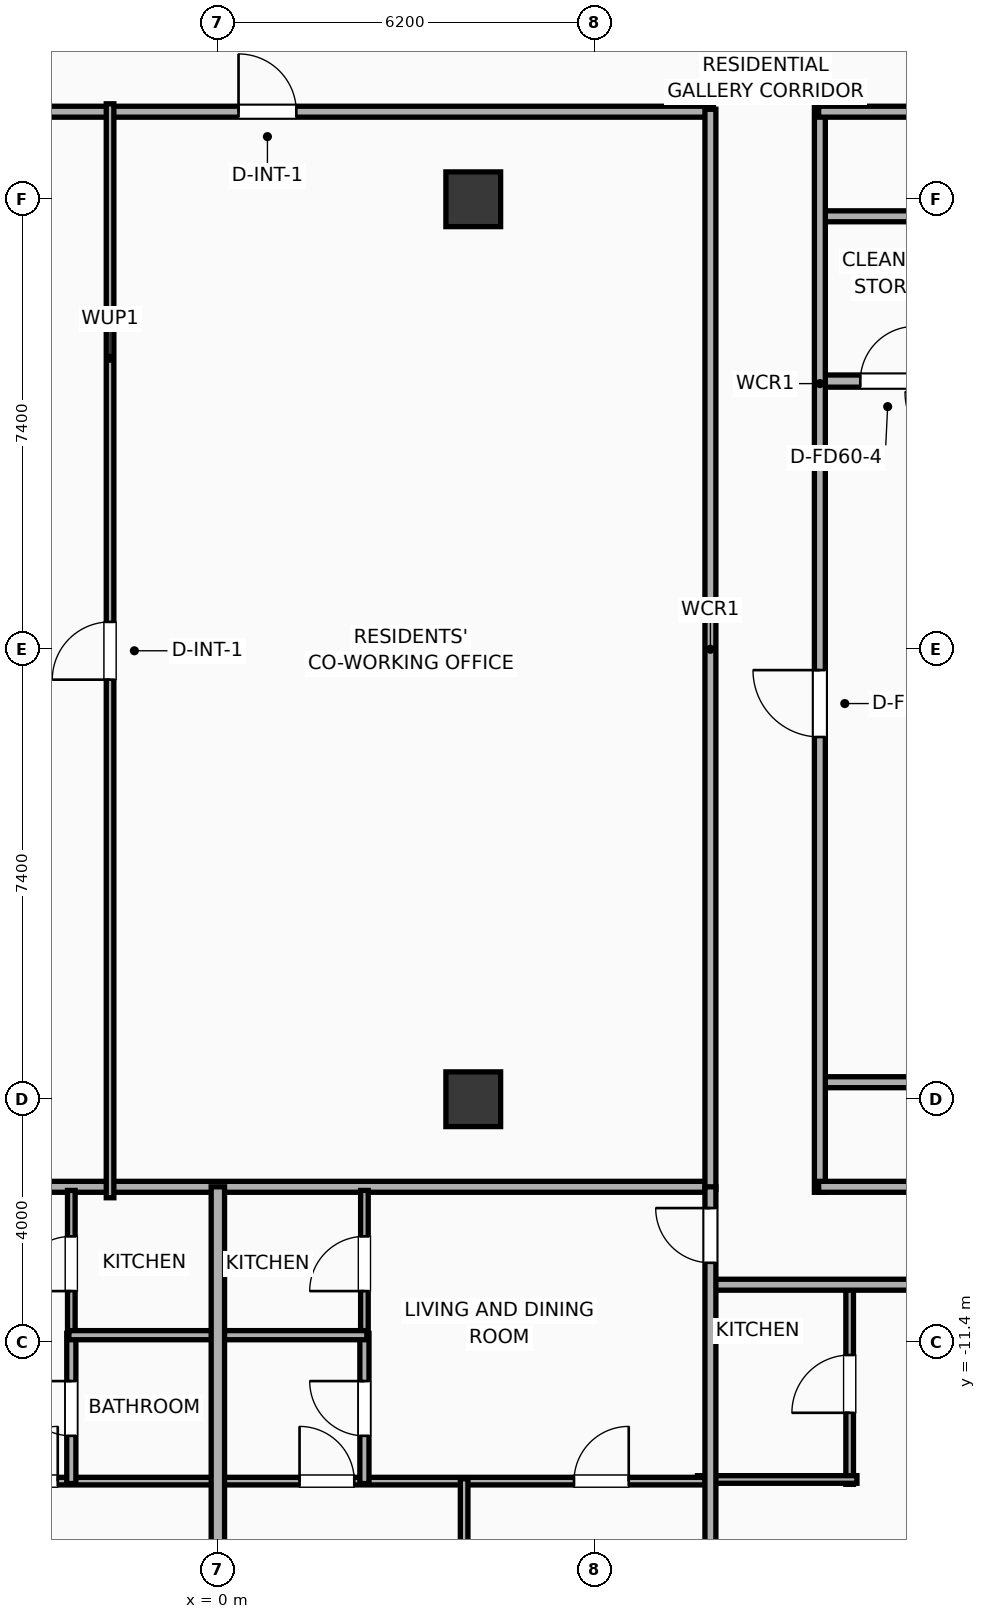
"""IFC4 building model, lengths in metres.
Left out: names, types, materials, properties, quantities, classifications, styles, units other than length and angle.
Written with IfcOpenShell. Run it as: python <this file> out.ifc"""

import sys

from ifc_helpers import new_model, si_unit, direction, frame, frame_2d, origin, origin_2d, place, context, subcontext, project, spatial, rectangle, extrude, element, fill, save


model = new_model("IFC4")
c1 = context("Model", 3, precision=1e-05, world=origin(), true_north=direction((0.0, 1.0)))
c2 = subcontext(c1, "Body", "Model", "MODEL_VIEW")
j1 = project(units=[si_unit("LENGTHUNIT", "METRE"), si_unit("PLANEANGLEUNIT", "RADIAN")], contexts=[c1])
p1 = place(None, origin())
s1 = spatial("IfcSite", under=j1, at=p1, CompositionType="ELEMENT")
p2 = place(p1, origin())
s2 = spatial("IfcBuilding", under=s1, at=p2, CompositionType="ELEMENT")
p3 = place(p2, frame((0.0, 0.0, 306.8)))
s3 = spatial("IfcBuildingStorey", under=s2, at=p3, CompositionType="ELEMENT", Elevation=306.8)
for number, where, z_axis, x_axis in (
    (1, (4.2, -7.4, 0.0), (0.0, 0.0, 1.0), (1.0, 0.0, 0.0)),
    (2, (4.2, 7.4, 0.0), (0.0, 0.0, 1.0), (1.0, 0.0, 0.0)),
):
    element("IfcColumn", number, at=place(p3, frame(where, z_axis=z_axis, x_axis=x_axis)), inside=s3, PredefinedType="COLUMN", context=c2, shape_type="SweptSolid", body=[
        extrude(rectangle(XDim=0.9, YDim=0.9, at=origin_2d()), origin(), (0.0, 0.0, 1.0), 3.9),
    ])
p4 = place(p3, frame((9.88, 4.41, 0.0), z_axis=(0.0, 0.0, 1.0), x_axis=(1.0, 0.0, 0.0)))
e3 = element("IfcWall", 3, at=p4, inside=s3, PredefinedType="PARTITIONING", context=c2, shape_type="SweptSolid", body=[
    extrude(rectangle(XDim=2.27, YDim=0.2, at=frame_2d((1.135, 0.0))), origin(), (0.0, 0.0, 1.0), 3.5),
])
p5 = place(p4, frame((0.685, 0.0, 0.0)))
e4 = element("IfcOpeningElement", 4, at=p5, cuts=e3, PredefinedType="OPENING", context=c2, shape_type="SweptSolid", body=[
    extrude(rectangle(XDim=0.9, YDim=2.05, at=frame_2d((0.45, 1.025))), frame((0.0, 0.11, 0.0), z_axis=(0.0, -1.0, 0.0), x_axis=(1.0, 0.0, 0.0)), (0.0, 0.0, 1.0), 0.22),
])
for number, where, z_axis, x_axis in (
    (5, (9.88, 7.12, 0.0), (0.0, 0.0, 1.0), (1.0, 0.0, 0.0)),
    (6, (9.88, -7.12, 0.0), (0.0, 0.0, 1.0), (1.0, 0.0, 0.0)),
):
    element("IfcWall", number, at=place(p3, frame(where, z_axis=z_axis, x_axis=x_axis)), inside=s3, PredefinedType="PARTITIONING", context=c2, shape_type="SweptSolid", body=[
        extrude(rectangle(XDim=2.27, YDim=0.18, at=frame_2d((1.135, 0.0))), origin(), (0.0, 0.0, 1.0), 2.54),
    ])
p6 = place(p3, frame((9.9, -8.93, 0.0), z_axis=(0.0, 0.0, 1.0), x_axis=(0.0, 1.0, 0.0)))
e7 = element("IfcWall", 7, at=p6, inside=s3, PredefinedType="PARTITIONING", context=c2, shape_type="SweptSolid", body=[
    extrude(rectangle(XDim=17.86, YDim=0.18, at=frame_2d((8.93, 0.0))), origin(), (0.0, 0.0, 1.0), 3.5),
])
p7 = place(p6, frame((7.487, 0.0, 0.0)))
e8 = element("IfcOpeningElement", 8, at=p7, cuts=e7, PredefinedType="OPENING", context=c2, shape_type="SweptSolid", body=[
    extrude(rectangle(XDim=1.1, YDim=2.05, at=frame_2d((0.55, 1.025))), frame((0.0, 0.1, 0.0), z_axis=(0.0, -1.0, 0.0), x_axis=(1.0, 0.0, 0.0)), (0.0, 0.0, 1.0), 0.2),
])
p8 = place(p3, frame((9.88, 8.84, 0.0), z_axis=(0.0, 0.0, 1.0), x_axis=(1.0, 0.0, 0.0)))
e9 = element("IfcWall", 9, at=p8, inside=s3, PredefinedType="PARTITIONING", context=c2, shape_type="SweptSolid", body=[
    extrude(rectangle(XDim=15.427, YDim=0.18, at=frame_2d((7.713, 0.0))), origin(), (0.0, 0.0, 1.0), 3.5),
])
p9 = place(p8, frame((12.663, 0.0, 0.0)))
e10 = element("IfcOpeningElement", 10, at=p9, cuts=e9, PredefinedType="OPENING", context=c2, shape_type="SweptSolid", body=[
    extrude(rectangle(XDim=0.9, YDim=2.05, at=frame_2d((0.45, 1.025))), frame((0.0, 0.1, 0.0), z_axis=(0.0, -1.0, 0.0), x_axis=(1.0, 0.0, 0.0)), (0.0, 0.0, 1.0), 0.2),
])
p10 = place(p3, frame((9.88, -8.84, 0.0), z_axis=(0.0, 0.0, 1.0), x_axis=(1.0, 0.0, 0.0)))
e11 = element("IfcWall", 11, at=p10, inside=s3, PredefinedType="PARTITIONING", context=c2, shape_type="SweptSolid", body=[
    extrude(rectangle(XDim=13.569, YDim=0.18, at=frame_2d((6.784, 0.0))), origin(), (0.0, 0.0, 1.0), 2.39),
])
p11 = place(p3, frame((-8.15, 8.84, 0.0), z_axis=(0.0, 0.0, 1.0), x_axis=(1.0, 0.0, 0.0)))
e12 = element("IfcWall", 12, at=p11, inside=s3, PredefinedType="PARTITIONING", context=c2, shape_type="SweptSolid", body=[
    extrude(rectangle(XDim=16.3, YDim=0.18, at=frame_2d((8.15, 0.0))), origin(), (0.0, 0.0, 1.0), 3.5),
])
p12 = place(p11, frame((8.49, 0.0, 0.0)))
e13 = element("IfcOpeningElement", 13, at=p12, cuts=e12, PredefinedType="OPENING", context=c2, shape_type="SweptSolid", body=[
    extrude(rectangle(XDim=0.95, YDim=2.05, at=frame_2d((0.475, 1.025))), frame((0.0, 0.1, 0.0), z_axis=(0.0, -1.0, 0.0), x_axis=(1.0, 0.0, 0.0)), (0.0, 0.0, 1.0), 0.2),
])
p13 = place(p3, frame((-8.15, -8.84, 0.0), z_axis=(0.0, 0.0, 1.0), x_axis=(1.0, 0.0, 0.0)))
e14 = element("IfcWall", 14, at=p13, inside=s3, PredefinedType="PARTITIONING", context=c2, shape_type="SweptSolid", body=[
    extrude(rectangle(XDim=16.3, YDim=0.18, at=frame_2d((8.15, 0.0))), origin(), (0.0, 0.0, 1.0), 3.5),
])
p14 = place(p3, frame((8.1, -8.88, 0.0), z_axis=(0.0, 0.0, 1.0), x_axis=(0.0, 1.0, 0.0)))
e15 = element("IfcWall", 15, at=p14, inside=s3, PredefinedType="PARTITIONING", context=c2, shape_type="SweptSolid", body=[
    extrude(rectangle(XDim=17.76, YDim=0.18, at=frame_2d((8.88, 0.0))), origin(), (0.0, 0.0, 1.0), 3.5),
])
p15 = place(p3, frame((-1.773, -9.02, 0.0), z_axis=(0.0, 0.0, 1.0), x_axis=(0.0, 1.0, 0.0)))
e16 = element("IfcWall", 16, at=p15, inside=s3, PredefinedType="PARTITIONING", context=c2, shape_type="SweptSolid", body=[
    extrude(rectangle(XDim=17.99, YDim=0.125, at=frame_2d((8.995, 0.0))), origin(), (0.0, 0.0, 1.0), 3.5),
])
p16 = place(p15, frame((8.52, 0.0, 0.0)))
e17 = element("IfcOpeningElement", 17, at=p16, cuts=e16, PredefinedType="OPENING", context=c2, shape_type="SweptSolid", body=[
    extrude(rectangle(XDim=0.95, YDim=2.05, at=frame_2d((0.475, 1.025))), frame((0.0, 0.073, 0.0), z_axis=(0.0, -1.0, 0.0), x_axis=(1.0, 0.0, 0.0)), (0.0, 0.0, 1.0), 0.145),
])
p17 = place(p3, frame((10.39, -13.733, 0.0), z_axis=(0.0, 0.0, 1.0), x_axis=(0.0, 1.0, 0.0)))
e18 = element("IfcWall", 18, at=p17, inside=s3, PredefinedType="PARTITIONING", context=c2, shape_type="SweptSolid", body=[
    extrude(rectangle(XDim=3.303, YDim=0.125, at=frame_2d((1.651, 0.0))), origin(), (0.0, 0.0, 1.0), 2.39),
])
p18 = place(p17, frame((1.177, 0.0, 0.0)))
e19 = element("IfcOpeningElement", 19, at=p18, cuts=e18, PredefinedType="OPENING", context=c2, shape_type="SweptSolid", body=[
    extrude(rectangle(XDim=0.95, YDim=2.05, at=frame_2d((0.475, 1.025))), frame((0.0, 0.073, 0.0), z_axis=(0.0, -1.0, 0.0), x_axis=(1.0, 0.0, 0.0)), (0.0, 0.0, 1.0), 0.145),
])
p19 = place(p3, frame((7.887, -13.653, 0.0), z_axis=(0.0, 0.0, 1.0), x_axis=(1.0, 0.0, 0.0)))
e20 = element("IfcWall", 20, at=p19, inside=s3, PredefinedType="PARTITIONING", context=c2, shape_type="SweptSolid", body=[
    extrude(rectangle(XDim=2.623, YDim=0.125, at=frame_2d((1.311, 0.0))), origin(), (0.0, 0.0, 1.0), 3.5),
])
p20 = place(p3, frame((8.08, -10.45, 0.0), z_axis=(0.0, 0.0, 1.0), x_axis=(1.0, 0.0, 0.0)))
e21 = element("IfcWall", 21, at=p20, inside=s3, PredefinedType="PARTITIONING", context=c2, shape_type="SweptSolid", body=[
    extrude(rectangle(XDim=15.199, YDim=0.18, at=frame_2d((7.6, 0.0))), origin(), (0.0, 0.0, 1.0), 3.5),
])
p21 = place(p20, frame((3.39, 0.0, 0.0)))
e22 = element("IfcOpeningElement", 22, at=p21, cuts=e21, PredefinedType="OPENING", context=c2, shape_type="SweptSolid", body=[
    extrude(rectangle(XDim=1.15, YDim=2.05, at=frame_2d((0.575, 1.025))), frame((0.0, 0.1, 0.0), z_axis=(0.0, -1.0, 0.0), x_axis=(1.0, 0.0, 0.0)), (0.0, 0.0, 1.0), 0.2),
])
p22 = place(p20, frame((11.024, 0.0, 0.0)))
e23 = element("IfcOpeningElement", 23, at=p22, cuts=e21, PredefinedType="OPENING", context=c2, shape_type="SweptSolid", body=[
    extrude(rectangle(XDim=1.15, YDim=2.05, at=frame_2d((0.575, 1.025))), frame((0.0, 0.1, 0.0), z_axis=(0.0, -1.0, 0.0), x_axis=(1.0, 0.0, 0.0)), (0.0, 0.0, 1.0), 0.2),
])
p23 = place(p3, frame((-8.08, -13.68, 0.0), z_axis=(0.0, 0.0, 1.0), x_axis=(1.0, 0.0, 0.0)))
e24 = element("IfcWall", 24, at=p23, inside=s3, PredefinedType="PARTITIONING", context=c2, shape_type="SweptSolid", body=[
    extrude(rectangle(XDim=8.06, YDim=0.125, at=frame_2d((4.03, 0.0))), origin(), (0.0, 0.0, 1.0), 3.5),
])
p24 = place(p23, frame((1.323, 0.0, 0.0)))
e25 = element("IfcOpeningElement", 25, at=p24, cuts=e24, PredefinedType="OPENING", context=c2, shape_type="SweptSolid", body=[
    extrude(rectangle(XDim=0.9, YDim=2.05, at=frame_2d((0.45, 1.025))), frame((0.0, 0.073, 0.0), z_axis=(0.0, -1.0, 0.0), x_axis=(1.0, 0.0, 0.0)), (0.0, 0.0, 1.0), 0.145),
])
p25 = place(p23, frame((4.547, 0.0, 0.0)))
e26 = element("IfcOpeningElement", 26, at=p25, cuts=e24, PredefinedType="OPENING", context=c2, shape_type="SweptSolid", body=[
    extrude(rectangle(XDim=0.9, YDim=2.05, at=frame_2d((0.45, 1.025))), frame((0.0, 0.073, 0.0), z_axis=(0.0, -1.0, 0.0), x_axis=(1.0, 0.0, 0.0)), (0.0, 0.0, 1.0), 0.145),
])
p26 = place(p3, frame((-2.41, -11.31, 0.0), z_axis=(0.0, 0.0, 1.0), x_axis=(0.0, 1.0, 0.0)))
e27 = element("IfcWall", 27, at=p26, inside=s3, PredefinedType="PARTITIONING", context=c2, shape_type="SweptSolid", body=[
    extrude(rectangle(XDim=2.41, YDim=0.125, at=frame_2d((1.205, 0.0))), origin(), (0.0, 0.0, 1.0), 3.5),
])
p27 = place(p26, frame((0.755, 0.0, 0.0)))
e28 = element("IfcOpeningElement", 28, at=p27, cuts=e27, PredefinedType="OPENING", context=c2, shape_type="SweptSolid", body=[
    extrude(rectangle(XDim=0.9, YDim=2.05, at=frame_2d((0.45, 1.025))), frame((0.0, 0.073, 0.0), z_axis=(0.0, -1.0, 0.0), x_axis=(1.0, 0.0, 0.0)), (0.0, 0.0, 1.0), 0.145),
])
p28 = place(p3, frame((-2.41, -13.72, 0.0), z_axis=(0.0, 0.0, 1.0), x_axis=(0.0, 1.0, 0.0)))
e29 = element("IfcWall", 29, at=p28, inside=s3, PredefinedType="PLUMBINGWALL", context=c2, shape_type="SweptSolid", body=[
    extrude(rectangle(XDim=2.47, YDim=0.15, at=frame_2d((1.235, 0.0))), origin(), (0.0, 0.0, 1.0), 3.5),
])
p29 = place(p28, frame((0.785, 0.0, 0.0)))
e30 = element("IfcOpeningElement", 30, at=p29, cuts=e29, PredefinedType="OPENING", context=c2, shape_type="SweptSolid", body=[
    extrude(rectangle(XDim=0.9, YDim=2.05, at=frame_2d((0.45, 1.025))), frame((0.0, 0.085, 0.0), z_axis=(0.0, -1.0, 0.0), x_axis=(1.0, 0.0, 0.0)), (0.0, 0.0, 1.0), 0.17),
])
p30 = place(p3, frame((-2.45, -11.28, 0.0), z_axis=(0.0, 0.0, 1.0), x_axis=(1.0, 0.0, 0.0)))
e31 = element("IfcWall", 31, at=p30, inside=s3, PredefinedType="PLUMBINGWALL", context=c2, shape_type="SweptSolid", body=[
    extrude(rectangle(XDim=2.43, YDim=0.15, at=frame_2d((1.215, 0.0))), origin(), (0.0, 0.0, 1.0), 3.5),
])
p31 = place(p3, frame((0.02, -13.68, 0.0), z_axis=(0.0, 0.0, 1.0), x_axis=(1.0, 0.0, 0.0)))
e32 = element("IfcWall", 32, at=p31, inside=s3, PredefinedType="PARTITIONING", context=c2, shape_type="SweptSolid", body=[
    extrude(rectangle(XDim=7.992, YDim=0.125, at=frame_2d((3.996, 0.0))), origin(), (0.0, 0.0, 1.0), 3.5),
])
p32 = place(p31, frame((1.323, 0.0, 0.0)))
e33 = element("IfcOpeningElement", 33, at=p32, cuts=e32, PredefinedType="OPENING", context=c2, shape_type="SweptSolid", body=[
    extrude(rectangle(XDim=0.9, YDim=2.05, at=frame_2d((0.45, 1.025))), frame((0.0, 0.073, 0.0), z_axis=(0.0, -1.0, 0.0), x_axis=(1.0, 0.0, 0.0)), (0.0, 0.0, 1.0), 0.145),
])
p33 = place(p31, frame((5.837, 0.0, 0.0)))
e34 = element("IfcOpeningElement", 34, at=p33, cuts=e32, PredefinedType="OPENING", context=c2, shape_type="SweptSolid", body=[
    extrude(rectangle(XDim=0.9, YDim=2.05, at=frame_2d((0.45, 1.025))), frame((0.0, 0.073, 0.0), z_axis=(0.0, -1.0, 0.0), x_axis=(1.0, 0.0, 0.0)), (0.0, 0.0, 1.0), 0.145),
])
p34 = place(p3, frame((2.41, -11.31, 0.0), z_axis=(0.0, 0.0, 1.0), x_axis=(0.0, 1.0, 0.0)))
e35 = element("IfcWall", 35, at=p34, inside=s3, PredefinedType="PARTITIONING", context=c2, shape_type="SweptSolid", body=[
    extrude(rectangle(XDim=2.41, YDim=0.125, at=frame_2d((1.205, 0.0))), origin(), (0.0, 0.0, 1.0), 2.39),
])
p35 = place(p34, frame((0.755, 0.0, 0.0)))
e36 = element("IfcOpeningElement", 36, at=p35, cuts=e35, PredefinedType="OPENING", context=c2, shape_type="SweptSolid", body=[
    extrude(rectangle(XDim=0.9, YDim=2.05, at=frame_2d((0.45, 1.025))), frame((0.0, 0.073, 0.0), z_axis=(0.0, -1.0, 0.0), x_axis=(1.0, 0.0, 0.0)), (0.0, 0.0, 1.0), 0.145),
])
p36 = place(p3, frame((2.41, -13.72, 0.0), z_axis=(0.0, 0.0, 1.0), x_axis=(0.0, 1.0, 0.0)))
e37 = element("IfcWall", 37, at=p36, inside=s3, PredefinedType="PLUMBINGWALL", context=c2, shape_type="SweptSolid", body=[
    extrude(rectangle(XDim=2.47, YDim=0.15, at=frame_2d((1.235, 0.0))), origin(), (0.0, 0.0, 1.0), 2.39),
])
p37 = place(p36, frame((0.785, 0.0, 0.0)))
e38 = element("IfcOpeningElement", 38, at=p37, cuts=e37, PredefinedType="OPENING", context=c2, shape_type="SweptSolid", body=[
    extrude(rectangle(XDim=0.9, YDim=2.05, at=frame_2d((0.45, 1.025))), frame((0.0, 0.085, 0.0), z_axis=(0.0, -1.0, 0.0), x_axis=(1.0, 0.0, 0.0)), (0.0, 0.0, 1.0), 0.17),
])
p38 = place(p3, frame((0.02, -11.28, 0.0), z_axis=(0.0, 0.0, 1.0), x_axis=(1.0, 0.0, 0.0)))
e39 = element("IfcWall", 39, at=p38, inside=s3, PredefinedType="PLUMBINGWALL", context=c2, shape_type="SweptSolid", body=[
    extrude(rectangle(XDim=2.43, YDim=0.15, at=frame_2d((1.215, 0.0))), origin(), (0.0, 0.0, 1.0), 3.5),
])
p39 = place(p3, frame((4.05, -19.432, 0.0), z_axis=(0.0, 0.0, 1.0), x_axis=(0.0, 1.0, 0.0)))
e40 = element("IfcWall", 40, at=p39, inside=s3, PredefinedType="PARTITIONING", context=c2, shape_type="SweptSolid", body=[
    extrude(rectangle(XDim=5.792, YDim=0.125, at=frame_2d((2.896, 0.0))), origin(), (0.0, 0.0, 1.0), 3.5),
])
p40 = place(p3, frame((8.1, -19.857, 0.0), z_axis=(0.0, 0.0, 1.0), x_axis=(0.0, 1.0, 0.0)))
e41 = element("IfcWall", 41, at=p40, inside=s3, PredefinedType="PARTITIONING", context=c2, shape_type="SweptSolid", body=[
    extrude(rectangle(XDim=11.017, YDim=0.18, at=frame_2d((5.509, 0.0))), origin(), (0.0, 0.0, 1.0), 3.5),
])
p41 = place(p40, frame((9.767, 0.0, 0.0)))
e42 = element("IfcOpeningElement", 42, at=p41, cuts=e41, PredefinedType="OPENING", context=c2, shape_type="SweptSolid", body=[
    extrude(rectangle(XDim=0.9, YDim=2.05, at=frame_2d((0.45, 1.025))), frame((0.0, 0.1, 0.0), z_axis=(0.0, -1.0, 0.0), x_axis=(1.0, 0.0, 0.0)), (0.0, 0.0, 1.0), 0.2),
])
p42 = place(p3, frame((0.0, -19.006, 0.0), z_axis=(0.0, 0.0, 1.0), x_axis=(0.0, 1.0, 0.0)))
e43 = element("IfcWall", 43, at=p42, inside=s3, PredefinedType="PARTITIONING", context=c2, shape_type="SweptSolid", body=[
    extrude(rectangle(XDim=10.166, YDim=0.22, at=frame_2d((5.083, 0.0))), origin(), (0.0, 0.0, 1.0), 2.39),
])
p43 = place(p5, origin())
e44 = element("IfcDoor", 44, at=p43, inside=s3, OperationType="SINGLE_SWING_RIGHT", PredefinedType="DOOR", context=c2, shape_type="SweptSolid", body=[
    extrude(rectangle(XDim=0.9, YDim=2.05, at=frame_2d((0.45, 1.025))), frame((0.0, 0.025, 0.0), z_axis=(0.0, -1.0, 0.0), x_axis=(1.0, 0.0, 0.0)), (0.0, 0.0, 1.0), 0.05),
])
fill(e4, e44)
p44 = place(p7, origin())
e45 = element("IfcDoor", 45, at=p44, inside=s3, OperationType="SINGLE_SWING_RIGHT", PredefinedType="DOOR", context=c2, shape_type="SweptSolid", body=[
    extrude(rectangle(XDim=1.1, YDim=2.05, at=frame_2d((0.55, 1.025))), frame((0.0, 0.025, 0.0), z_axis=(0.0, -1.0, 0.0), x_axis=(1.0, 0.0, 0.0)), (0.0, 0.0, 1.0), 0.05),
])
fill(e8, e45)
p45 = place(p12, origin())
e46 = element("IfcDoor", 46, at=p45, inside=s3, OperationType="SINGLE_SWING_LEFT", PredefinedType="DOOR", context=c2, shape_type="SweptSolid", body=[
    extrude(rectangle(XDim=0.95, YDim=2.05, at=frame_2d((0.475, 1.025))), frame((0.0, 0.025, 0.0), z_axis=(0.0, -1.0, 0.0), x_axis=(1.0, 0.0, 0.0)), (0.0, 0.0, 1.0), 0.05),
])
fill(e13, e46)
p46 = place(p16, origin())
e47 = element("IfcDoor", 47, at=p46, inside=s3, OperationType="SINGLE_SWING_LEFT", PredefinedType="DOOR", context=c2, shape_type="SweptSolid", body=[
    extrude(rectangle(XDim=0.95, YDim=2.05, at=frame_2d((0.475, 1.025))), frame((0.0, 0.025, 0.0), z_axis=(0.0, -1.0, 0.0), x_axis=(1.0, 0.0, 0.0)), (0.0, 0.0, 1.0), 0.05),
])
fill(e17, e47)
p47 = place(p18, origin())
e48 = element("IfcDoor", 48, at=p47, inside=s3, OperationType="SINGLE_SWING_LEFT", PredefinedType="DOOR", context=c2, shape_type="SweptSolid", body=[
    extrude(rectangle(XDim=0.95, YDim=2.05, at=frame_2d((0.475, 1.025))), frame((0.0, 0.025, 0.0), z_axis=(0.0, -1.0, 0.0), x_axis=(1.0, 0.0, 0.0)), (0.0, 0.0, 1.0), 0.05),
])
fill(e19, e48)
p48 = place(p25, origin())
e49 = element("IfcDoor", 49, at=p48, inside=s3, OperationType="SINGLE_SWING_RIGHT", PredefinedType="DOOR", context=c2, shape_type="SweptSolid", body=[
    extrude(rectangle(XDim=0.9, YDim=2.05, at=frame_2d((0.45, 1.025))), frame((0.0, 0.025, 0.0), z_axis=(0.0, -1.0, 0.0), x_axis=(1.0, 0.0, 0.0)), (0.0, 0.0, 1.0), 0.05),
])
fill(e26, e49)
p49 = place(p27, origin())
e50 = element("IfcDoor", 50, at=p49, inside=s3, OperationType="SINGLE_SWING_LEFT", PredefinedType="DOOR", context=c2, shape_type="SweptSolid", body=[
    extrude(rectangle(XDim=0.9, YDim=2.05, at=frame_2d((0.45, 1.025))), frame((0.0, 0.025, 0.0), z_axis=(0.0, -1.0, 0.0), x_axis=(1.0, 0.0, 0.0)), (0.0, 0.0, 1.0), 0.05),
])
fill(e28, e50)
p50 = place(p29, origin())
e51 = element("IfcDoor", 51, at=p50, inside=s3, OperationType="SINGLE_SWING_RIGHT", PredefinedType="DOOR", context=c2, shape_type="SweptSolid", body=[
    extrude(rectangle(XDim=0.9, YDim=2.05, at=frame_2d((0.45, 1.025))), frame((0.0, 0.025, 0.0), z_axis=(0.0, -1.0, 0.0), x_axis=(1.0, 0.0, 0.0)), (0.0, 0.0, 1.0), 0.05),
])
fill(e30, e51)
p51 = place(p32, origin())
e52 = element("IfcDoor", 52, at=p51, inside=s3, OperationType="SINGLE_SWING_LEFT", PredefinedType="DOOR", context=c2, shape_type="SweptSolid", body=[
    extrude(rectangle(XDim=0.9, YDim=2.05, at=frame_2d((0.45, 1.025))), frame((0.0, 0.025, 0.0), z_axis=(0.0, -1.0, 0.0), x_axis=(1.0, 0.0, 0.0)), (0.0, 0.0, 1.0), 0.05),
])
fill(e33, e52)
p52 = place(p33, origin())
e53 = element("IfcDoor", 53, at=p52, inside=s3, OperationType="SINGLE_SWING_RIGHT", PredefinedType="DOOR", context=c2, shape_type="SweptSolid", body=[
    extrude(rectangle(XDim=0.9, YDim=2.05, at=frame_2d((0.45, 1.025))), frame((0.0, 0.025, 0.0), z_axis=(0.0, -1.0, 0.0), x_axis=(1.0, 0.0, 0.0)), (0.0, 0.0, 1.0), 0.05),
])
fill(e34, e53)
p53 = place(p35, origin())
e54 = element("IfcDoor", 54, at=p53, inside=s3, OperationType="SINGLE_SWING_LEFT", PredefinedType="DOOR", context=c2, shape_type="SweptSolid", body=[
    extrude(rectangle(XDim=0.9, YDim=2.05, at=frame_2d((0.45, 1.025))), frame((0.0, 0.025, 0.0), z_axis=(0.0, -1.0, 0.0), x_axis=(1.0, 0.0, 0.0)), (0.0, 0.0, 1.0), 0.05),
])
fill(e36, e54)
p54 = place(p37, origin())
e55 = element("IfcDoor", 55, at=p54, inside=s3, OperationType="SINGLE_SWING_RIGHT", PredefinedType="DOOR", context=c2, shape_type="SweptSolid", body=[
    extrude(rectangle(XDim=0.9, YDim=2.05, at=frame_2d((0.45, 1.025))), frame((0.0, 0.025, 0.0), z_axis=(0.0, -1.0, 0.0), x_axis=(1.0, 0.0, 0.0)), (0.0, 0.0, 1.0), 0.05),
])
fill(e38, e55)
p55 = place(p41, origin())
e56 = element("IfcDoor", 56, at=p55, inside=s3, OperationType="SINGLE_SWING_RIGHT", PredefinedType="DOOR", context=c2, shape_type="SweptSolid", body=[
    extrude(rectangle(XDim=0.9, YDim=2.05, at=frame_2d((0.45, 1.025))), frame((0.0, 0.025, 0.0), z_axis=(0.0, -1.0, 0.0), x_axis=(1.0, 0.0, 0.0)), (0.0, 0.0, 1.0), 0.05),
])
fill(e42, e56)
save(model, sys.argv[1])
